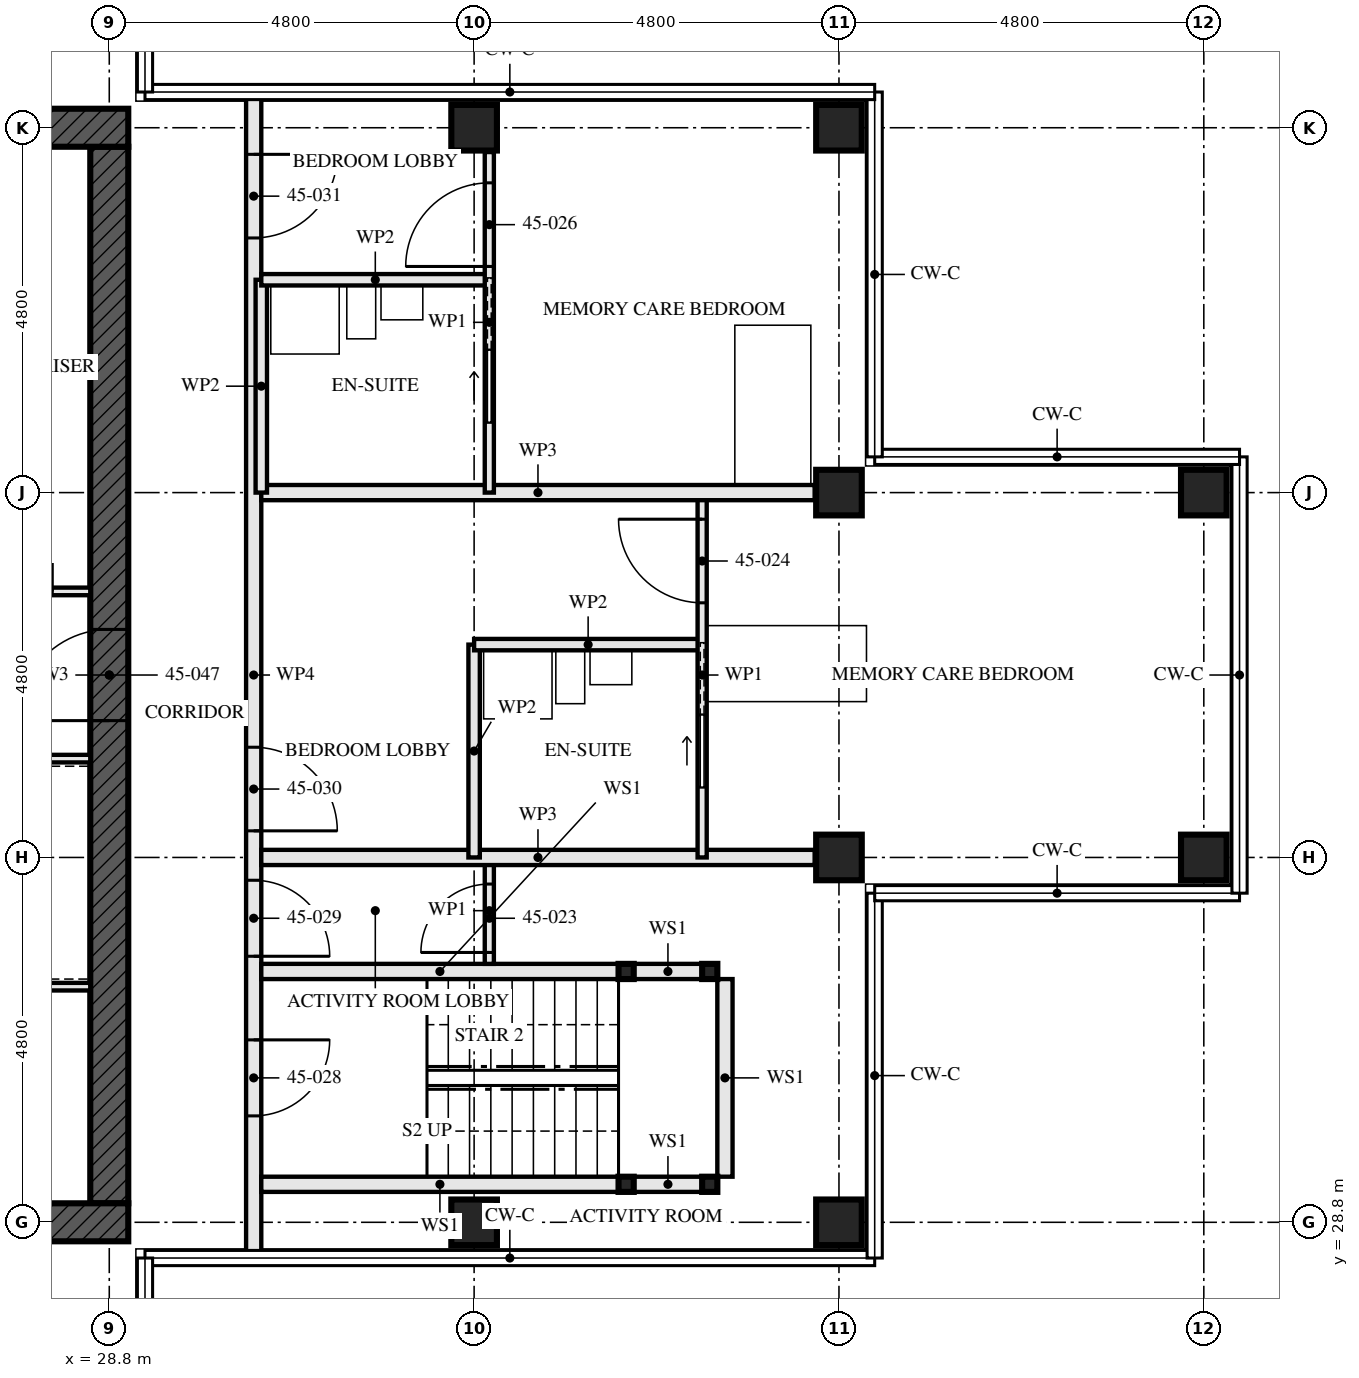
"""IFC4 building model, lengths in metres.
Left out: names, types, materials, properties, quantities, classifications, styles, units other than length and angle.
Written with IfcOpenShell. Run it as: python <this file> out.ifc"""

import sys

from ifc_helpers import new_model, si_unit, direction, frame, frame_2d, origin, origin_2d, place, context, subcontext, project, spatial, rectangle, hollow_rectangle, extrude, element, fill, save


model = new_model("IFC4")
c1 = context("Model", 3, precision=1e-05, world=origin(), true_north=direction((0.0, 1.0)))
c2 = subcontext(c1, "Body", "Model", "MODEL_VIEW")
j1 = project(units=[si_unit("LENGTHUNIT", "METRE"), si_unit("PLANEANGLEUNIT", "RADIAN")], contexts=[c1])
p1 = place(None, origin())
s1 = spatial("IfcSite", under=j1, at=p1, CompositionType="ELEMENT")
p2 = place(p1, origin())
s2 = spatial("IfcBuilding", under=s1, at=p2, CompositionType="ELEMENT")
p3 = place(p2, frame((0.0, 0.0, 165.5)))
s3 = spatial("IfcBuildingStorey", under=s2, at=p3, CompositionType="ELEMENT", Elevation=165.5)
for number, where, z_axis, x_axis in (
    (1, (33.6, 28.8, 0.0), (0.0, 0.0, 1.0), (0.0, 1.0, 0.0)),
    (2, (33.6, 43.2, 0.0), (0.0, 0.0, 1.0), (0.0, 1.0, 0.0)),
):
    element("IfcColumn", number, at=place(p3, frame(where, z_axis=z_axis, x_axis=x_axis)), inside=s3, PredefinedType="COLUMN", context=c2, shape_type="SweptSolid", body=[
        extrude(hollow_rectangle(XDim=0.6, YDim=0.6, WallThickness=0.08, at=origin_2d()), origin(), (0.0, 0.0, 1.0), 3.5),
    ])
for number, where, z_axis, x_axis in (
    (3, (38.4, 28.8, 0.0), (0.0, 0.0, 1.0), (0.0, 1.0, 0.0)),
    (4, (38.4, 33.6, 0.0), (0.0, 0.0, 1.0), (0.0, 1.0, 0.0)),
    (5, (38.4, 38.4, 0.0), (0.0, 0.0, 1.0), (0.0, 1.0, 0.0)),
    (6, (38.4, 43.2, 0.0), (0.0, 0.0, 1.0), (0.0, 1.0, 0.0)),
    (7, (43.2, 33.6, 0.0), (0.0, 0.0, 1.0), (0.0, 1.0, 0.0)),
    (8, (43.2, 38.4, 0.0), (0.0, 0.0, 1.0), (0.0, 1.0, 0.0)),
):
    element("IfcColumn", number, at=place(p3, frame(where, z_axis=z_axis, x_axis=x_axis)), inside=s3, PredefinedType="COLUMN", context=c2, shape_type="SweptSolid", body=[
        extrude(hollow_rectangle(XDim=0.6, YDim=0.6, WallThickness=0.06, at=origin_2d()), origin(), (0.0, 0.0, 1.0), 3.5),
    ])
p4 = place(p3, frame((14.15, 28.8, -0.17), z_axis=(0.0, 0.0, 1.0), x_axis=(1.0, 0.0, 0.0)))
e9 = element("IfcWall", 9, at=p4, inside=s3, PredefinedType="SHEAR", context=c2, shape_type="SweptSolid", body=[
    extrude(rectangle(XDim=14.9, YDim=0.5, at=frame_2d((7.45, 0.0))), origin(), (0.0, 0.0, 1.0), 3.5),
])
p5 = place(p4, frame((6.85, 0.0, 0.17)))
e10 = element("IfcOpeningElement", 10, at=p5, cuts=e9, PredefinedType="OPENING", context=c2, shape_type="SweptSolid", body=[
    extrude(rectangle(XDim=1.2, YDim=2.1, at=frame_2d((0.6, 1.05))), frame((0.0, 0.26, 0.0), z_axis=(0.0, -1.0, 0.0), x_axis=(1.0, 0.0, 0.0)), (0.0, 0.0, 1.0), 0.521),
])
p6 = place(p3, frame((29.05, 43.2, -0.17), z_axis=(0.0, 0.0, 1.0), x_axis=(-1.0, 0.0, 0.0)))
e11 = element("IfcWall", 11, at=p6, inside=s3, PredefinedType="SHEAR", context=c2, shape_type="SweptSolid", body=[
    extrude(rectangle(XDim=14.9, YDim=0.5, at=frame_2d((7.45, 0.0))), origin(), (0.0, 0.0, 1.0), 3.5),
])
p7 = place(p6, frame((6.85, 0.0, 0.17)))
e12 = element("IfcOpeningElement", 12, at=p7, cuts=e11, PredefinedType="OPENING", context=c2, shape_type="SweptSolid", body=[
    extrude(rectangle(XDim=1.2, YDim=2.1, at=frame_2d((0.6, 1.05))), frame((0.0, 0.26, 0.0), z_axis=(0.0, -1.0, 0.0), x_axis=(1.0, 0.0, 0.0)), (0.0, 0.0, 1.0), 0.521),
])
p8 = place(p3, frame((28.8, 29.05, -0.17), z_axis=(0.0, 0.0, 1.0), x_axis=(0.0, 1.0, 0.0)))
e13 = element("IfcWall", 13, at=p8, inside=s3, PredefinedType="SHEAR", context=c2, shape_type="SweptSolid", body=[
    extrude(rectangle(XDim=13.9, YDim=0.5, at=frame_2d((6.95, 0.0))), origin(), (0.0, 0.0, 1.0), 3.5),
])
p9 = place(p8, frame((6.35, 0.0, 0.17)))
e14 = element("IfcOpeningElement", 14, at=p9, cuts=e13, PredefinedType="OPENING", context=c2, shape_type="SweptSolid", body=[
    extrude(rectangle(XDim=1.2, YDim=2.1, at=frame_2d((0.6, 1.05))), frame((0.0, 0.26, 0.0), z_axis=(0.0, -1.0, 0.0), x_axis=(1.0, 0.0, 0.0)), (0.0, 0.0, 1.0), 0.521),
])
for number, where, z_axis, x_axis in (
    (15, (36.7, 29.3, 0.0), (0.0, 0.0, 1.0), (1.0, 0.0, 0.0)),
    (16, (36.7, 32.1, 0.0), (0.0, 0.0, 1.0), (1.0, 0.0, 0.0)),
    (17, (35.6, 29.3, 0.0), (0.0, 0.0, 1.0), (1.0, 0.0, 0.0)),
    (18, (35.6, 32.1, 0.0), (0.0, 0.0, 1.0), (1.0, 0.0, 0.0)),
):
    element("IfcColumn", number, at=place(p3, frame(where, z_axis=z_axis, x_axis=x_axis)), inside=s3, PredefinedType="COLUMN", context=c2, shape_type="SweptSolid", body=[
        extrude(hollow_rectangle(XDim=0.2, YDim=0.2, WallThickness=0.008, at=origin_2d()), origin(), (0.0, 0.0, 1.0), 3.33),
    ])
p10 = place(p3, frame((36.6, 29.3, 0.0), z_axis=(0.0, 0.0, 1.0), x_axis=(-1.0, 0.0, 0.0)))
e19 = element("IfcWall", 19, at=p10, inside=s3, PredefinedType="SOLIDWALL", context=c2, shape_type="SweptSolid", body=[
    extrude(rectangle(XDim=0.9, YDim=0.2, at=frame_2d((0.45, 0.0))), origin(), (0.0, 0.0, 1.0), 2.99),
])
p11 = place(p3, frame((35.5, 29.3, 0.0), z_axis=(0.0, 0.0, 1.0), x_axis=(-1.0, 0.0, 0.0)))
e20 = element("IfcWall", 20, at=p11, inside=s3, PredefinedType="SOLIDWALL", context=c2, shape_type="SweptSolid", body=[
    extrude(rectangle(XDim=4.7, YDim=0.2, at=frame_2d((2.35, 0.0))), origin(), (0.0, 0.0, 1.0), 2.99),
])
p12 = place(p3, frame((36.6, 32.1, 0.0), z_axis=(0.0, 0.0, 1.0), x_axis=(-1.0, 0.0, 0.0)))
e21 = element("IfcWall", 21, at=p12, inside=s3, PredefinedType="SOLIDWALL", context=c2, shape_type="SweptSolid", body=[
    extrude(rectangle(XDim=0.9, YDim=0.2, at=frame_2d((0.45, 0.0))), origin(), (0.0, 0.0, 1.0), 2.99),
])
p13 = place(p3, frame((35.5, 32.1, 0.0), z_axis=(0.0, 0.0, 1.0), x_axis=(-1.0, 0.0, 0.0)))
e22 = element("IfcWall", 22, at=p13, inside=s3, PredefinedType="SOLIDWALL", context=c2, shape_type="SweptSolid", body=[
    extrude(rectangle(XDim=4.7, YDim=0.2, at=frame_2d((2.35, 0.0))), origin(), (0.0, 0.0, 1.0), 2.99),
])
p14 = place(p3, frame((36.9, 29.4, 0.0), z_axis=(0.0, 0.0, 1.0), x_axis=(0.0, 1.0, 0.0)))
e23 = element("IfcWall", 23, at=p14, inside=s3, PredefinedType="SOLIDWALL", context=c2, shape_type="SweptSolid", body=[
    extrude(rectangle(XDim=2.6, YDim=0.2, at=frame_2d((1.3, 0.0))), origin(), (0.0, 0.0, 1.0), 3.33),
])
p15 = place(p3, frame((33.8, 32.2, 0.0), z_axis=(0.0, 0.0, 1.0), x_axis=(0.0, 1.0, 0.0)))
e24 = element("IfcWall", 24, at=p15, inside=s3, PredefinedType="PARTITIONING", context=c2, shape_type="SweptSolid", body=[
    extrude(rectangle(XDim=1.4, YDim=0.12, at=frame_2d((0.7, 0.0))), origin(), (0.0, 0.0, 1.0), 3.33),
])
p16 = place(p15, frame((0.15, 0.0, 0.0)))
e25 = element("IfcOpeningElement", 25, at=p16, cuts=e24, PredefinedType="OPENING", context=c2, shape_type="SweptSolid", body=[
    extrude(rectangle(XDim=0.9, YDim=2.1, at=frame_2d((0.45, 1.05))), frame((0.0, 0.071, 0.0), z_axis=(0.0, -1.0, 0.0), x_axis=(1.0, 0.0, 0.0)), (0.0, 0.0, 1.0), 0.141),
])
p17 = place(p3, frame((38.08, 33.6, 0.0), z_axis=(0.0, 0.0, 1.0), x_axis=(-1.0, 0.0, 0.0)))
e26 = element("IfcWall", 26, at=p17, inside=s3, PredefinedType="PARTITIONING", context=c2, shape_type="SweptSolid", body=[
    extrude(rectangle(XDim=7.28, YDim=0.2, at=frame_2d((3.64, 0.0))), origin(), (0.0, 0.0, 1.0), 2.55),
])
p18 = place(p3, frame((36.6, 36.4, 0.0), z_axis=(0.0, 0.0, 1.0), x_axis=(-1.0, 0.0, 0.0)))
e27 = element("IfcWall", 27, at=p18, inside=s3, PredefinedType="PARTITIONING", context=c2, shape_type="SweptSolid", body=[
    extrude(rectangle(XDim=3.0, YDim=0.15, at=frame_2d((1.5, 0.0))), origin(), (0.0, 0.0, 1.0), 3.33),
])
p19 = place(p3, frame((33.6, 33.6, 0.0), z_axis=(0.0, 0.0, 1.0), x_axis=(0.0, 1.0, 0.0)))
e28 = element("IfcWall", 28, at=p19, inside=s3, PredefinedType="PARTITIONING", context=c2, shape_type="SweptSolid", body=[
    extrude(rectangle(XDim=2.8, YDim=0.15, at=frame_2d((1.4, 0.0))), origin(), (0.0, 0.0, 1.0), 3.33),
])
p20 = place(p3, frame((36.6, 33.6, 0.0), z_axis=(0.0, 0.0, 1.0), x_axis=(0.0, 1.0, 0.0)))
e29 = element("IfcWall", 29, at=p20, inside=s3, PredefinedType="PARTITIONING", context=c2, shape_type="SweptSolid", body=[
    extrude(rectangle(XDim=4.8, YDim=0.12, at=frame_2d((2.4, 0.0))), origin(), (0.0, 0.0, 1.0), 3.33),
])
p21 = place(p20, frame((3.35, 0.0, 0.0)))
e30 = element("IfcOpeningElement", 30, at=p21, cuts=e29, PredefinedType="OPENING", context=c2, shape_type="SweptSolid", body=[
    extrude(rectangle(XDim=1.1, YDim=2.1, at=frame_2d((0.55, 1.05))), frame((0.0, 0.071, 0.0), z_axis=(0.0, -1.0, 0.0), x_axis=(1.0, 0.0, 0.0)), (0.0, 0.0, 1.0), 0.141),
])
p22 = place(p20, frame((0.925, 0.0, 0.0)))
e31 = element("IfcOpeningElement", 31, at=p22, cuts=e29, PredefinedType="OPENING", context=c2, shape_type="SweptSolid", body=[
    extrude(rectangle(XDim=0.95, YDim=2.1, at=frame_2d((0.475, 1.05))), frame((0.0, 0.071, 0.0), z_axis=(0.0, -1.0, 0.0), x_axis=(1.0, 0.0, 0.0)), (0.0, 0.0, 1.0), 0.141),
])
p23 = place(p3, frame((38.08, 38.4, 0.0), z_axis=(0.0, 0.0, 1.0), x_axis=(-1.0, 0.0, 0.0)))
e32 = element("IfcWall", 32, at=p23, inside=s3, PredefinedType="PARTITIONING", context=c2, shape_type="SweptSolid", body=[
    extrude(rectangle(XDim=7.28, YDim=0.2, at=frame_2d((3.64, 0.0))), origin(), (0.0, 0.0, 1.0), 2.55),
])
p24 = place(p3, frame((33.8, 41.2, 0.0), z_axis=(0.0, 0.0, 1.0), x_axis=(-1.0, 0.0, 0.0)))
e33 = element("IfcWall", 33, at=p24, inside=s3, PredefinedType="PARTITIONING", context=c2, shape_type="SweptSolid", body=[
    extrude(rectangle(XDim=3.0, YDim=0.15, at=frame_2d((1.5, 0.0))), origin(), (0.0, 0.0, 1.0), 3.33),
])
p25 = place(p3, frame((30.8, 38.4, 0.0), z_axis=(0.0, 0.0, 1.0), x_axis=(0.0, 1.0, 0.0)))
e34 = element("IfcWall", 34, at=p25, inside=s3, PredefinedType="PARTITIONING", context=c2, shape_type="SweptSolid", body=[
    extrude(rectangle(XDim=2.8, YDim=0.15, at=frame_2d((1.4, 0.0))), origin(), (0.0, 0.0, 1.0), 3.33),
])
p26 = place(p3, frame((33.8, 38.4, 0.0), z_axis=(0.0, 0.0, 1.0), x_axis=(0.0, 1.0, 0.0)))
e35 = element("IfcWall", 35, at=p26, inside=s3, PredefinedType="PARTITIONING", context=c2, shape_type="SweptSolid", body=[
    extrude(rectangle(XDim=4.48, YDim=0.12, at=frame_2d((2.24, 0.0))), origin(), (0.0, 0.0, 1.0), 3.33),
])
p27 = place(p26, frame((2.975, 0.0, 0.0)))
e36 = element("IfcOpeningElement", 36, at=p27, cuts=e35, PredefinedType="OPENING", context=c2, shape_type="SweptSolid", body=[
    extrude(rectangle(XDim=1.1, YDim=2.1, at=frame_2d((0.55, 1.05))), frame((0.0, 0.071, 0.0), z_axis=(0.0, -1.0, 0.0), x_axis=(1.0, 0.0, 0.0)), (0.0, 0.0, 1.0), 0.141),
])
p28 = place(p26, frame((0.925, 0.0, 0.0)))
e37 = element("IfcOpeningElement", 37, at=p28, cuts=e35, PredefinedType="OPENING", context=c2, shape_type="SweptSolid", body=[
    extrude(rectangle(XDim=0.95, YDim=2.1, at=frame_2d((0.475, 1.05))), frame((0.0, 0.071, 0.0), z_axis=(0.0, -1.0, 0.0), x_axis=(1.0, 0.0, 0.0)), (0.0, 0.0, 1.0), 0.141),
])
p29 = place(p3, frame((30.7, 28.35, 0.0), z_axis=(0.0, 0.0, 1.0), x_axis=(0.0, 1.0, 0.0)))
e38 = element("IfcWall", 38, at=p29, inside=s3, PredefinedType="PARTITIONING", context=c2, shape_type="SweptSolid", body=[
    extrude(rectangle(XDim=15.3, YDim=0.2, at=frame_2d((7.65, 0.0))), origin(), (0.0, 0.0, 1.0), 2.32),
])
p30 = place(p29, frame((1.85, 0.0, 0.0)))
e39 = element("IfcOpeningElement", 39, at=p30, cuts=e38, PredefinedType="OPENING", context=c2, shape_type="SweptSolid", body=[
    extrude(rectangle(XDim=1.0, YDim=2.1, at=frame_2d((0.5, 1.05))), frame((0.0, 0.111, 0.0), z_axis=(0.0, -1.0, 0.0), x_axis=(1.0, 0.0, 0.0)), (0.0, 0.0, 1.0), 0.221),
])
p31 = place(p29, frame((3.95, 0.0, 0.0)))
e40 = element("IfcOpeningElement", 40, at=p31, cuts=e38, PredefinedType="OPENING", context=c2, shape_type="SweptSolid", body=[
    extrude(rectangle(XDim=1.0, YDim=2.1, at=frame_2d((0.5, 1.05))), frame((0.0, 0.111, 0.0), z_axis=(0.0, -1.0, 0.0), x_axis=(1.0, 0.0, 0.0)), (0.0, 0.0, 1.0), 0.221),
])
p32 = place(p29, frame((5.6, 0.0, 0.0)))
e41 = element("IfcOpeningElement", 41, at=p32, cuts=e38, PredefinedType="OPENING", context=c2, shape_type="SweptSolid", body=[
    extrude(rectangle(XDim=1.1, YDim=2.1, at=frame_2d((0.55, 1.05))), frame((0.0, 0.111, 0.0), z_axis=(0.0, -1.0, 0.0), x_axis=(1.0, 0.0, 0.0)), (0.0, 0.0, 1.0), 0.221),
])
p33 = place(p29, frame((13.4, 0.0, 0.0)))
e42 = element("IfcOpeningElement", 42, at=p33, cuts=e38, PredefinedType="OPENING", context=c2, shape_type="SweptSolid", body=[
    extrude(rectangle(XDim=1.1, YDim=2.1, at=frame_2d((0.55, 1.05))), frame((0.0, 0.111, 0.0), z_axis=(0.0, -1.0, 0.0), x_axis=(1.0, 0.0, 0.0)), (0.0, 0.0, 1.0), 0.221),
])
p34 = place(p3, frame((23.05, 34.9, 0.0), z_axis=(0.0, 0.0, 1.0), x_axis=(1.0, 0.0, 0.0)))
e43 = element("IfcWall", 43, at=p34, inside=s3, PredefinedType="SOLIDWALL", context=c2, shape_type="SweptSolid", body=[
    extrude(rectangle(XDim=5.5, YDim=0.1, at=frame_2d((2.75, 0.0))), origin(), (0.0, 0.0, 1.0), 3.33),
])
p35 = place(p34, frame((0.85, 0.0, 0.0)))
e44 = element("IfcOpeningElement", 44, at=p35, cuts=e43, PredefinedType="OPENING", context=c2, shape_type="SweptSolid", body=[
    extrude(rectangle(XDim=1.0, YDim=2.1, at=frame_2d((0.5, 1.05))), frame((0.0, 0.061, 0.0), z_axis=(0.0, -1.0, 0.0), x_axis=(1.0, 0.0, 0.0)), (0.0, 0.0, 1.0), 0.121),
])
p36 = place(p34, frame((3.625, 0.0, 0.0)))
e45 = element("IfcOpeningElement", 45, at=p36, cuts=e43, PredefinedType="OPENING", context=c2, shape_type="SweptSolid", body=[
    extrude(rectangle(XDim=1.0, YDim=2.1, at=frame_2d((0.5, 1.05))), frame((0.0, 0.061, 0.0), z_axis=(0.0, -1.0, 0.0), x_axis=(1.0, 0.0, 0.0)), (0.0, 0.0, 1.0), 0.121),
])
p37 = place(p3, frame((22.65, 37.1, 0.0), z_axis=(0.0, 0.0, 1.0), x_axis=(1.0, 0.0, 0.0)))
e46 = element("IfcWall", 46, at=p37, inside=s3, PredefinedType="SOLIDWALL", context=c2, shape_type="SweptSolid", body=[
    extrude(rectangle(XDim=5.9, YDim=0.1, at=frame_2d((2.95, 0.0))), origin(), (0.0, 0.0, 1.0), 3.33),
])
p38 = place(p37, frame((3.1, 0.0, 0.0)))
e47 = element("IfcOpeningElement", 47, at=p38, cuts=e46, PredefinedType="OPENING", context=c2, shape_type="SweptSolid", body=[
    extrude(rectangle(XDim=0.9, YDim=2.1, at=frame_2d((0.45, 1.05))), frame((0.0, 0.061, 0.0), z_axis=(0.0, -1.0, 0.0), x_axis=(1.0, 0.0, 0.0)), (0.0, 0.0, 1.0), 0.121),
])
p39 = place(p37, frame((4.7, 0.0, 0.0)))
e48 = element("IfcOpeningElement", 48, at=p39, cuts=e46, PredefinedType="OPENING", context=c2, shape_type="SweptSolid", body=[
    extrude(rectangle(XDim=0.7, YDim=2.1, at=frame_2d((0.35, 1.05))), frame((0.0, 0.061, 0.0), z_axis=(0.0, -1.0, 0.0), x_axis=(1.0, 0.0, 0.0)), (0.0, 0.0, 1.0), 0.121),
])
p40 = place(p3, frame((23.15, 31.9, 0.0), z_axis=(0.0, 0.0, 1.0), x_axis=(1.0, 0.0, 0.0)))
e49 = element("IfcWall", 49, at=p40, inside=s3, PredefinedType="SOLIDWALL", context=c2, shape_type="SweptSolid", body=[
    extrude(rectangle(XDim=5.4, YDim=0.1, at=frame_2d((2.7, 0.0))), origin(), (0.0, 0.0, 1.0), 3.33),
])
p41 = place(p16, origin())
e50 = element("IfcDoor", 50, at=p41, inside=s3, OperationType="SINGLE_SWING_RIGHT", PredefinedType="DOOR", context=c2, shape_type="SweptSolid", body=[
    extrude(rectangle(XDim=0.9, YDim=2.1, at=frame_2d((0.45, 1.05))), frame((0.0, 0.022, 0.0), z_axis=(0.0, -1.0, 0.0), x_axis=(1.0, 0.0, 0.0)), (0.0, 0.0, 1.0), 0.044),
])
fill(e25, e50)
p42 = place(p21, origin())
e51 = element("IfcDoor", 51, at=p42, inside=s3, OperationType="SINGLE_SWING_LEFT", PredefinedType="DOOR", context=c2, shape_type="SweptSolid", body=[
    extrude(rectangle(XDim=1.1, YDim=2.1, at=frame_2d((0.55, 1.05))), frame((0.0, 0.022, 0.0), z_axis=(0.0, -1.0, 0.0), x_axis=(1.0, 0.0, 0.0)), (0.0, 0.0, 1.0), 0.044),
])
fill(e30, e51)
p43 = place(p22, origin())
e52 = element("IfcDoor", 52, at=p43, inside=s3, OperationType="SLIDING_TO_LEFT", PredefinedType="DOOR", context=c2, shape_type="SweptSolid", body=[
    extrude(rectangle(XDim=0.95, YDim=2.1, at=frame_2d((0.475, 1.05))), frame((0.0, 0.022, 0.0), z_axis=(0.0, -1.0, 0.0), x_axis=(1.0, 0.0, 0.0)), (0.0, 0.0, 1.0), 0.044),
])
fill(e31, e52)
p44 = place(p27, origin())
e53 = element("IfcDoor", 53, at=p44, inside=s3, OperationType="SINGLE_SWING_RIGHT", PredefinedType="DOOR", context=c2, shape_type="SweptSolid", body=[
    extrude(rectangle(XDim=1.1, YDim=2.1, at=frame_2d((0.55, 1.05))), frame((0.0, 0.022, 0.0), z_axis=(0.0, -1.0, 0.0), x_axis=(1.0, 0.0, 0.0)), (0.0, 0.0, 1.0), 0.044),
])
fill(e36, e53)
p45 = place(p28, origin())
e54 = element("IfcDoor", 54, at=p45, inside=s3, OperationType="SLIDING_TO_LEFT", PredefinedType="DOOR", context=c2, shape_type="SweptSolid", body=[
    extrude(rectangle(XDim=0.95, YDim=2.1, at=frame_2d((0.475, 1.05))), frame((0.0, 0.022, 0.0), z_axis=(0.0, -1.0, 0.0), x_axis=(1.0, 0.0, 0.0)), (0.0, 0.0, 1.0), 0.044),
])
fill(e37, e54)
p46 = place(p30, frame((1.0, 0.0, 0.0), z_axis=(0.0, 0.0, 1.0), x_axis=(-1.0, 0.0, 0.0)))
e55 = element("IfcDoor", 55, at=p46, inside=s3, OperationType="SINGLE_SWING_RIGHT", PredefinedType="DOOR", context=c2, shape_type="SweptSolid", body=[
    extrude(rectangle(XDim=1.0, YDim=2.1, at=frame_2d((0.5, 1.05))), frame((0.0, 0.032, 0.0), z_axis=(0.0, -1.0, 0.0), x_axis=(1.0, 0.0, 0.0)), (0.0, 0.0, 1.0), 0.064),
])
fill(e39, e55)
p47 = place(p31, frame((1.0, 0.0, 0.0), z_axis=(0.0, 0.0, 1.0), x_axis=(-1.0, 0.0, 0.0)))
e56 = element("IfcDoor", 56, at=p47, inside=s3, OperationType="SINGLE_SWING_LEFT", PredefinedType="DOOR", context=c2, shape_type="SweptSolid", body=[
    extrude(rectangle(XDim=1.0, YDim=2.1, at=frame_2d((0.5, 1.05))), frame((0.0, 0.027, 0.0), z_axis=(0.0, -1.0, 0.0), x_axis=(1.0, 0.0, 0.0)), (0.0, 0.0, 1.0), 0.054),
])
fill(e40, e56)
p48 = place(p32, frame((1.1, 0.0, 0.0), z_axis=(0.0, 0.0, 1.0), x_axis=(-1.0, 0.0, 0.0)))
e57 = element("IfcDoor", 57, at=p48, inside=s3, OperationType="SINGLE_SWING_LEFT", PredefinedType="DOOR", context=c2, shape_type="SweptSolid", body=[
    extrude(rectangle(XDim=1.1, YDim=2.1, at=frame_2d((0.55, 1.05))), frame((0.0, 0.027, 0.0), z_axis=(0.0, -1.0, 0.0), x_axis=(1.0, 0.0, 0.0)), (0.0, 0.0, 1.0), 0.054),
])
fill(e41, e57)
p49 = place(p33, frame((1.1, 0.0, 0.0), z_axis=(0.0, 0.0, 1.0), x_axis=(-1.0, 0.0, 0.0)))
e58 = element("IfcDoor", 58, at=p49, inside=s3, OperationType="SINGLE_SWING_RIGHT", PredefinedType="DOOR", context=c2, shape_type="SweptSolid", body=[
    extrude(rectangle(XDim=1.1, YDim=2.1, at=frame_2d((0.55, 1.05))), frame((0.0, 0.027, 0.0), z_axis=(0.0, -1.0, 0.0), x_axis=(1.0, 0.0, 0.0)), (0.0, 0.0, 1.0), 0.054),
])
fill(e42, e58)
p50 = place(p9, origin())
e59 = element("IfcDoor", 59, at=p50, inside=s3, OperationType="SINGLE_SWING_LEFT", PredefinedType="DOOR", context=c2, shape_type="SweptSolid", body=[
    extrude(rectangle(XDim=1.2, YDim=2.1, at=frame_2d((0.6, 1.05))), frame((0.0, 0.027, 0.0), z_axis=(0.0, -1.0, 0.0), x_axis=(1.0, 0.0, 0.0)), (0.0, 0.0, 1.0), 0.054),
])
fill(e14, e59)
save(model, sys.argv[1])
